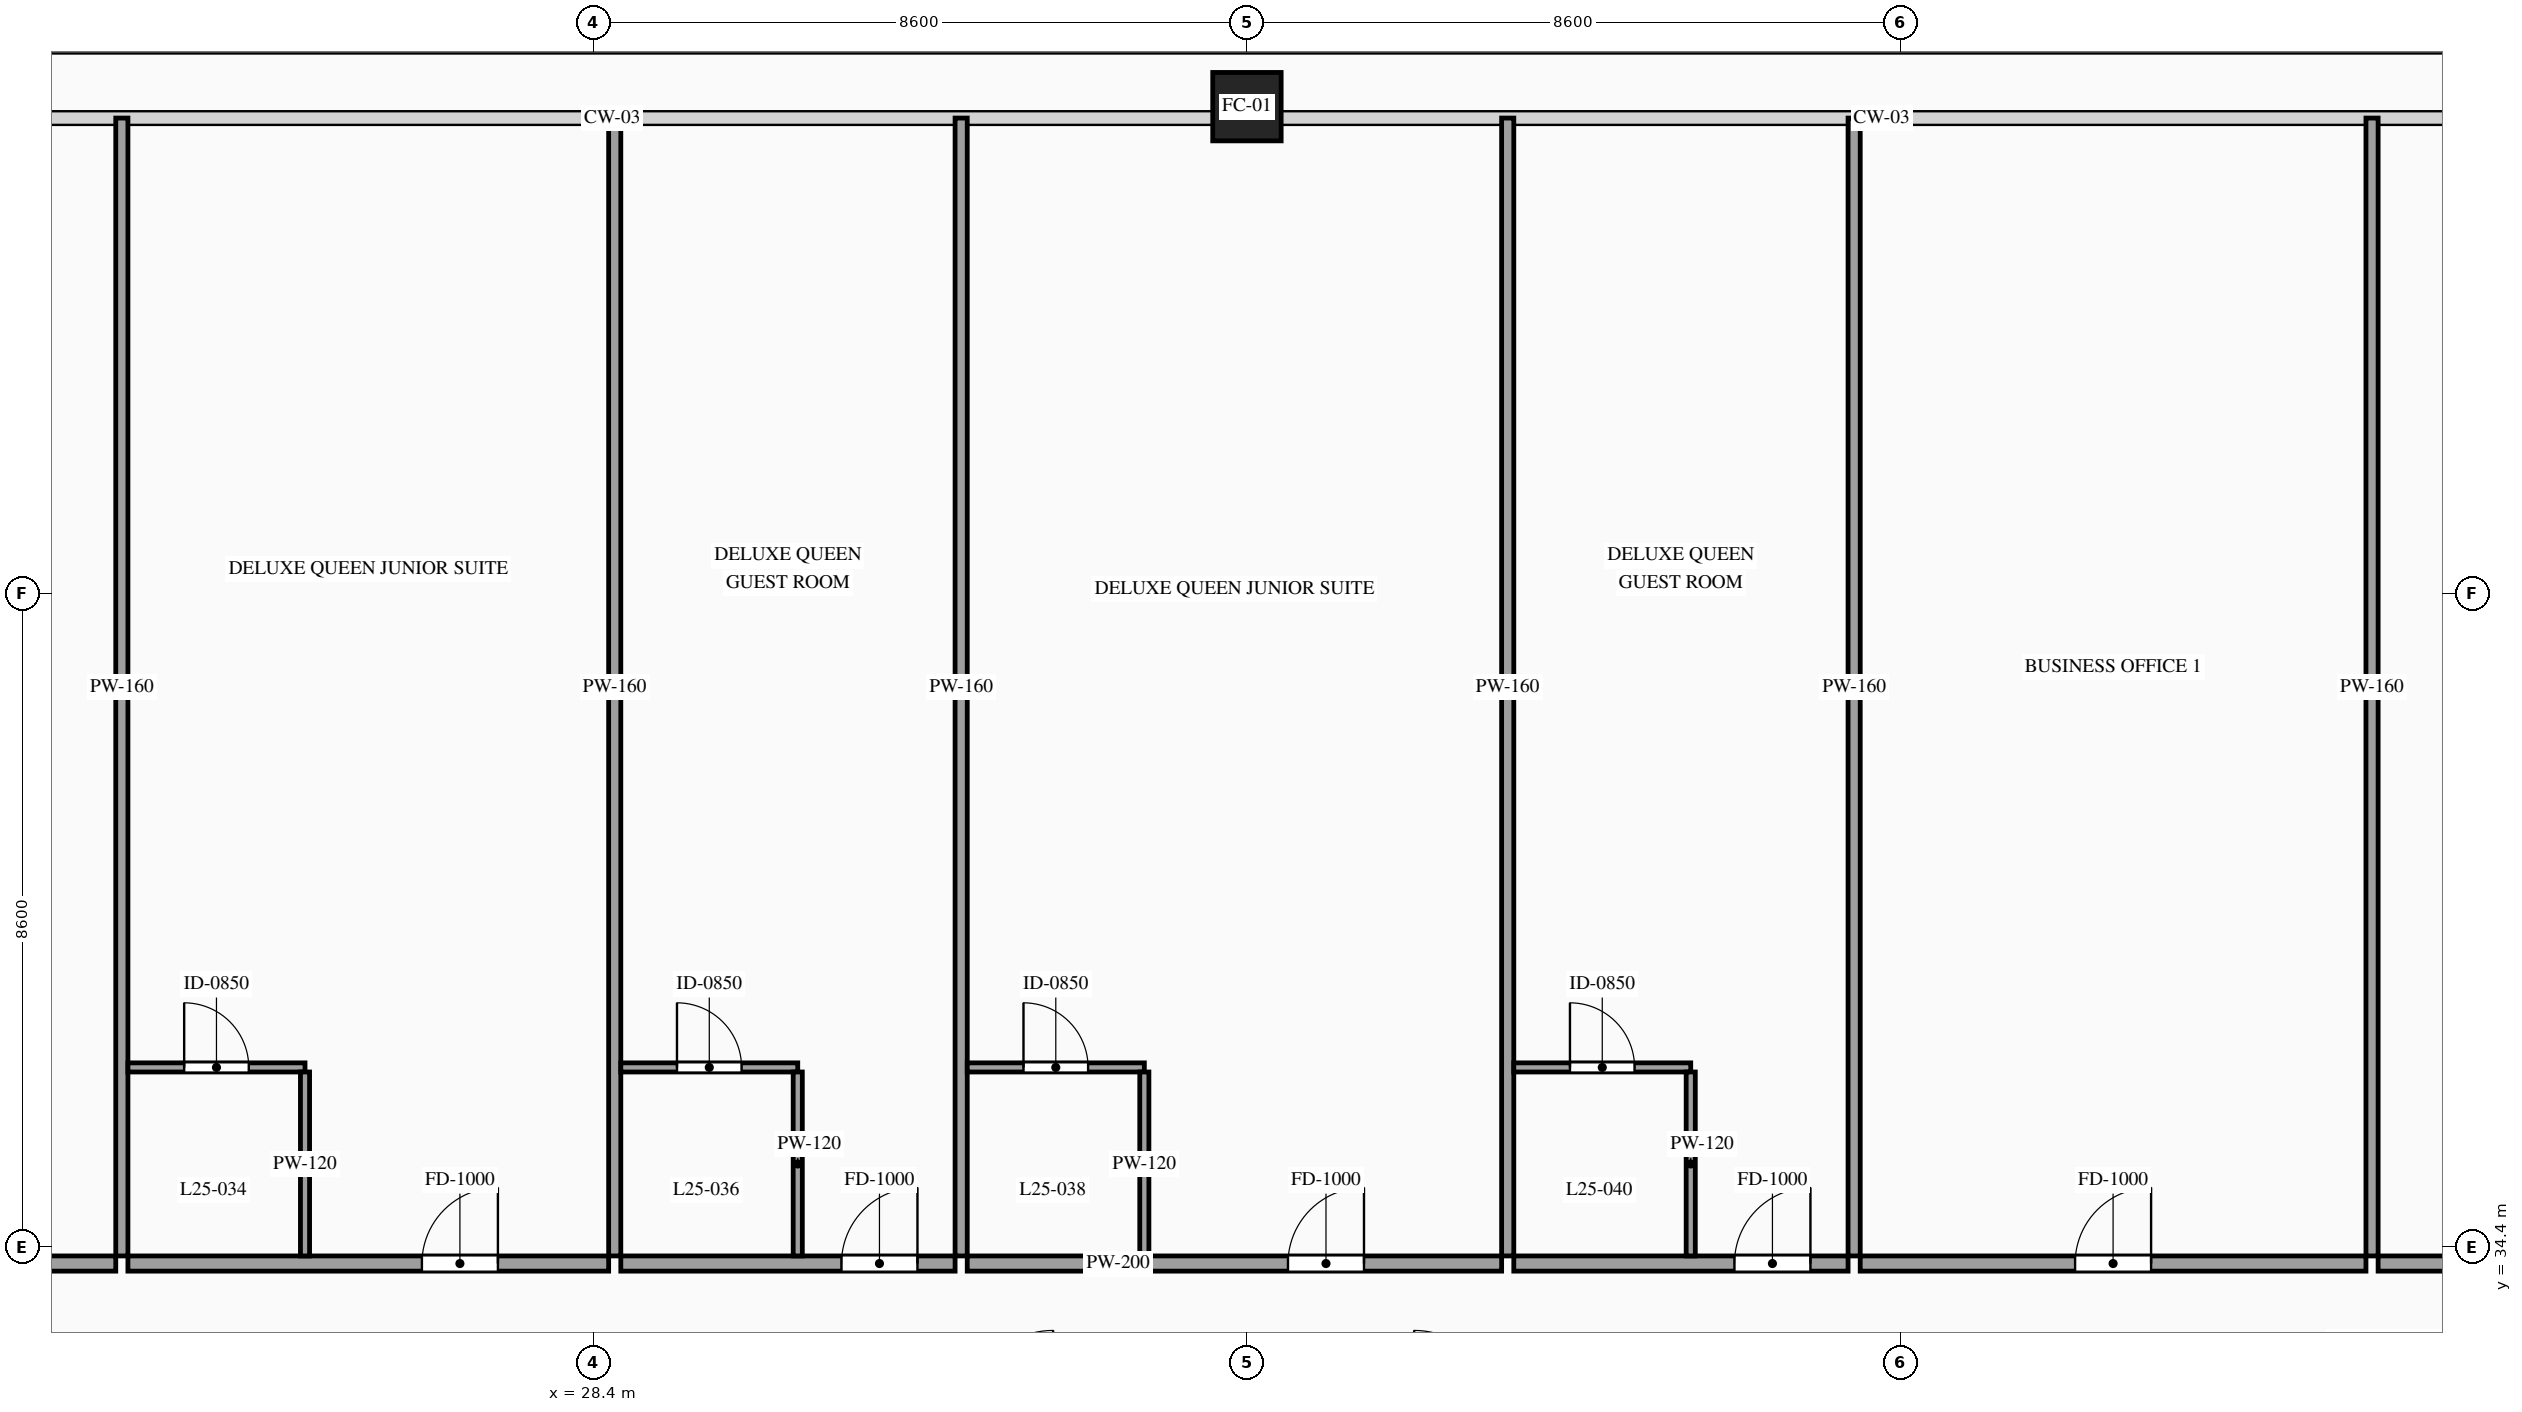
"""IFC4 building model, lengths in metres.
Left out: names, types, materials, properties, quantities, classifications, styles, units other than length and angle.
Written with IfcOpenShell. Run it as: python <this file> out.ifc"""

import sys

from ifc_helpers import new_model, si_unit, direction, frame, frame_2d, origin, origin_2d, place, context, subcontext, project, spatial, rectangle, hollow_rectangle, extrude, source, transform, mapped, element, fill, save


model = new_model("IFC4")
c1 = context("Model", 3, precision=1e-05, world=origin(), true_north=direction((0.0, 1.0)))
c2 = subcontext(c1, "Body", "Model", "MODEL_VIEW")
j1 = project(units=[si_unit("LENGTHUNIT", "METRE"), si_unit("PLANEANGLEUNIT", "RADIAN")], contexts=[c1])
p1 = place(None, origin())
s1 = spatial("IfcSite", under=j1, at=p1, CompositionType="ELEMENT")
p2 = place(p1, origin())
s2 = spatial("IfcBuilding", under=s1, at=p2, CompositionType="ELEMENT")
p3 = place(p2, frame((0.0, 0.0, 97.4)))
s3 = spatial("IfcBuildingStorey", under=s2, at=p3, CompositionType="ELEMENT", Elevation=97.4)
m1 = source(origin(), c2, "Body", "SweptSolid", [
    extrude(hollow_rectangle(XDim=0.9, YDim=0.9, WallThickness=0.042, at=origin_2d()), origin(), (0.0, 0.0, 1.0), 3.6),
])
p4 = place(p3, frame((37.0, 49.4, 0.0), z_axis=(0.0, 0.0, 1.0), x_axis=(1.0, 0.0, 0.0)))
e1 = element("IfcColumn", 1, at=p4, inside=s3, PredefinedType="COLUMN", context=c2, shape_type="MappedRepresentation", body=[
    mapped(m1, transform((0.0, 0.0, 0.0), scale=1.0)),
])
p5 = place(p3, frame((16.44, 34.18, 0.0), z_axis=(0.0, 0.0, 1.0), x_axis=(1.0, 0.0, 0.0)))
e2 = element("IfcWall", 2, at=p5, inside=s3, PredefinedType="PARTITIONING", context=c2, shape_type="SweptSolid", body=[
    extrude(rectangle(XDim=5.677, YDim=0.2, at=frame_2d((2.838, 0.0))), origin(), (0.0, 0.0, 1.0), 3.38),
])
p6 = place(p5, frame((3.543, 0.0, 0.0)))
e3 = element("IfcOpeningElement", 3, at=p6, cuts=e2, PredefinedType="OPENING", context=c2, shape_type="SweptSolid", body=[
    extrude(rectangle(XDim=1.0, YDim=2.2, at=frame_2d((0.5, 1.1))), frame((0.0, 0.115, 0.0), z_axis=(0.0, -1.0, 0.0), x_axis=(1.0, 0.0, 0.0)), (0.0, 0.0, 1.0), 0.23),
])
m2 = source(origin(), c2, "Body", "SweptSolid", [
    extrude(rectangle(XDim=14.97, YDim=0.16, at=frame_2d((7.485, 0.0))), origin(), (0.0, 0.0, 1.0), 3.38),
])
p7 = place(p3, frame((22.197, 34.28, 0.0), z_axis=(0.0, 0.0, 1.0), x_axis=(0.0, 1.0, 0.0)))
e4 = element("IfcWall", 4, at=p7, inside=s3, PredefinedType="PARTITIONING", context=c2, shape_type="MappedRepresentation", body=[
    mapped(m2, transform((0.0, 0.0, 0.0), scale=1.0)),
])
p8 = place(p3, frame((22.277, 34.18, 0.0), z_axis=(0.0, 0.0, 1.0), x_axis=(1.0, 0.0, 0.0)))
e5 = element("IfcWall", 5, at=p8, inside=s3, PredefinedType="PARTITIONING", context=c2, shape_type="SweptSolid", body=[
    extrude(rectangle(XDim=6.325, YDim=0.2, at=frame_2d((3.163, 0.0))), origin(), (0.0, 0.0, 1.0), 3.38),
])
p9 = place(p8, frame((3.868, 0.0, 0.0)))
e6 = element("IfcOpeningElement", 6, at=p9, cuts=e5, PredefinedType="OPENING", context=c2, shape_type="SweptSolid", body=[
    extrude(rectangle(XDim=1.0, YDim=2.2, at=frame_2d((0.5, 1.1))), frame((0.0, 0.115, 0.0), z_axis=(0.0, -1.0, 0.0), x_axis=(1.0, 0.0, 0.0)), (0.0, 0.0, 1.0), 0.23),
])
p10 = place(p3, frame((28.682, 34.28, 0.0), z_axis=(0.0, 0.0, 1.0), x_axis=(0.0, 1.0, 0.0)))
e7 = element("IfcWall", 7, at=p10, inside=s3, PredefinedType="PARTITIONING", context=c2, shape_type="MappedRepresentation", body=[
    mapped(m2, transform((0.0, 0.0, 0.0), scale=1.0)),
])
p11 = place(p3, frame((22.277, 36.76, 0.0), z_axis=(0.0, 0.0, 1.0), x_axis=(1.0, 0.0, 0.0)))
e8 = element("IfcWall", 8, at=p11, inside=s3, PredefinedType="PARTITIONING", context=c2, shape_type="SweptSolid", body=[
    extrude(rectangle(XDim=2.33, YDim=0.12, at=frame_2d((1.165, 0.0))), origin(), (0.0, 0.0, 1.0), 3.38),
])
p12 = place(p11, frame((0.74, 0.0, 0.0)))
e9 = element("IfcOpeningElement", 9, at=p12, cuts=e8, PredefinedType="OPENING", context=c2, shape_type="SweptSolid", body=[
    extrude(rectangle(XDim=0.85, YDim=2.1, at=frame_2d((0.425, 1.05))), frame((0.0, 0.075, 0.0), z_axis=(0.0, -1.0, 0.0), x_axis=(1.0, 0.0, 0.0)), (0.0, 0.0, 1.0), 0.15),
])
m3 = source(origin(), c2, "Body", "SweptSolid", [
    extrude(rectangle(XDim=2.42, YDim=0.12, at=frame_2d((1.21, 0.0))), origin(), (0.0, 0.0, 1.0), 3.38),
])
p13 = place(p3, frame((24.607, 34.28, 0.0), z_axis=(0.0, 0.0, 1.0), x_axis=(0.0, 1.0, 0.0)))
e10 = element("IfcWall", 10, at=p13, inside=s3, PredefinedType="PARTITIONING", context=c2, shape_type="MappedRepresentation", body=[
    mapped(m3, transform((0.0, 0.0, 0.0), scale=1.0)),
])
p14 = place(p3, frame((28.762, 34.18, 0.0), z_axis=(0.0, 0.0, 1.0), x_axis=(1.0, 0.0, 0.0)))
e11 = element("IfcWall", 11, at=p14, inside=s3, PredefinedType="PARTITIONING", context=c2, shape_type="SweptSolid", body=[
    extrude(rectangle(XDim=4.398, YDim=0.2, at=frame_2d((2.199, 0.0))), origin(), (0.0, 0.0, 1.0), 3.38),
])
p15 = place(p14, frame((2.903, 0.0, 0.0)))
e12 = element("IfcOpeningElement", 12, at=p15, cuts=e11, PredefinedType="OPENING", context=c2, shape_type="SweptSolid", body=[
    extrude(rectangle(XDim=1.0, YDim=2.2, at=frame_2d((0.5, 1.1))), frame((0.0, 0.115, 0.0), z_axis=(0.0, -1.0, 0.0), x_axis=(1.0, 0.0, 0.0)), (0.0, 0.0, 1.0), 0.23),
])
p16 = place(p3, frame((33.24, 34.28, 0.0), z_axis=(0.0, 0.0, 1.0), x_axis=(0.0, 1.0, 0.0)))
e13 = element("IfcWall", 13, at=p16, inside=s3, PredefinedType="PARTITIONING", context=c2, shape_type="MappedRepresentation", body=[
    mapped(m2, transform((0.0, 0.0, 0.0), scale=1.0)),
])
p17 = place(p3, frame((28.762, 36.76, 0.0), z_axis=(0.0, 0.0, 1.0), x_axis=(1.0, 0.0, 0.0)))
e14 = element("IfcWall", 14, at=p17, inside=s3, PredefinedType="PARTITIONING", context=c2, shape_type="SweptSolid", body=[
    extrude(rectangle(XDim=2.328, YDim=0.12, at=frame_2d((1.164, 0.0))), origin(), (0.0, 0.0, 1.0), 3.38),
])
p18 = place(p17, frame((0.739, 0.0, 0.0)))
e15 = element("IfcOpeningElement", 15, at=p18, cuts=e14, PredefinedType="OPENING", context=c2, shape_type="SweptSolid", body=[
    extrude(rectangle(XDim=0.85, YDim=2.1, at=frame_2d((0.425, 1.05))), frame((0.0, 0.075, 0.0), z_axis=(0.0, -1.0, 0.0), x_axis=(1.0, 0.0, 0.0)), (0.0, 0.0, 1.0), 0.15),
])
p19 = place(p3, frame((31.09, 34.28, 0.0), z_axis=(0.0, 0.0, 1.0), x_axis=(0.0, 1.0, 0.0)))
e16 = element("IfcWall", 16, at=p19, inside=s3, PredefinedType="PARTITIONING", context=c2, shape_type="MappedRepresentation", body=[
    mapped(m3, transform((0.0, 0.0, 0.0), scale=1.0)),
])
p20 = place(p3, frame((33.32, 34.18, 0.0), z_axis=(0.0, 0.0, 1.0), x_axis=(1.0, 0.0, 0.0)))
e17 = element("IfcWall", 17, at=p20, inside=s3, PredefinedType="PARTITIONING", context=c2, shape_type="SweptSolid", body=[
    extrude(rectangle(XDim=7.031, YDim=0.2, at=frame_2d((3.516, 0.0))), origin(), (0.0, 0.0, 1.0), 3.38),
])
p21 = place(p20, frame((4.22, 0.0, 0.0)))
e18 = element("IfcOpeningElement", 18, at=p21, cuts=e17, PredefinedType="OPENING", context=c2, shape_type="SweptSolid", body=[
    extrude(rectangle(XDim=1.0, YDim=2.2, at=frame_2d((0.5, 1.1))), frame((0.0, 0.115, 0.0), z_axis=(0.0, -1.0, 0.0), x_axis=(1.0, 0.0, 0.0)), (0.0, 0.0, 1.0), 0.23),
])
p22 = place(p3, frame((40.431, 34.28, 0.0), z_axis=(0.0, 0.0, 1.0), x_axis=(0.0, 1.0, 0.0)))
e19 = element("IfcWall", 19, at=p22, inside=s3, PredefinedType="PARTITIONING", context=c2, shape_type="MappedRepresentation", body=[
    mapped(m2, transform((0.0, 0.0, 0.0), scale=1.0)),
])
p23 = place(p3, frame((33.32, 36.76, 0.0), z_axis=(0.0, 0.0, 1.0), x_axis=(1.0, 0.0, 0.0)))
e20 = element("IfcWall", 20, at=p23, inside=s3, PredefinedType="PARTITIONING", context=c2, shape_type="SweptSolid", body=[
    extrude(rectangle(XDim=2.33, YDim=0.12, at=frame_2d((1.165, 0.0))), origin(), (0.0, 0.0, 1.0), 3.38),
])
p24 = place(p23, frame((0.74, 0.0, 0.0)))
e21 = element("IfcOpeningElement", 21, at=p24, cuts=e20, PredefinedType="OPENING", context=c2, shape_type="SweptSolid", body=[
    extrude(rectangle(XDim=0.85, YDim=2.1, at=frame_2d((0.425, 1.05))), frame((0.0, 0.075, 0.0), z_axis=(0.0, -1.0, 0.0), x_axis=(1.0, 0.0, 0.0)), (0.0, 0.0, 1.0), 0.15),
])
p25 = place(p3, frame((35.65, 34.28, 0.0), z_axis=(0.0, 0.0, 1.0), x_axis=(0.0, 1.0, 0.0)))
e22 = element("IfcWall", 22, at=p25, inside=s3, PredefinedType="PARTITIONING", context=c2, shape_type="MappedRepresentation", body=[
    mapped(m3, transform((0.0, 0.0, 0.0), scale=1.0)),
])
p26 = place(p3, frame((40.511, 34.18, 0.0), z_axis=(0.0, 0.0, 1.0), x_axis=(1.0, 0.0, 0.0)))
e23 = element("IfcWall", 23, at=p26, inside=s3, PredefinedType="PARTITIONING", context=c2, shape_type="SweptSolid", body=[
    extrude(rectangle(XDim=4.398, YDim=0.2, at=frame_2d((2.199, 0.0))), origin(), (0.0, 0.0, 1.0), 3.38),
])
p27 = place(p26, frame((2.903, 0.0, 0.0)))
e24 = element("IfcOpeningElement", 24, at=p27, cuts=e23, PredefinedType="OPENING", context=c2, shape_type="SweptSolid", body=[
    extrude(rectangle(XDim=1.0, YDim=2.2, at=frame_2d((0.5, 1.1))), frame((0.0, 0.115, 0.0), z_axis=(0.0, -1.0, 0.0), x_axis=(1.0, 0.0, 0.0)), (0.0, 0.0, 1.0), 0.23),
])
p28 = place(p3, frame((44.989, 34.28, 0.0), z_axis=(0.0, 0.0, 1.0), x_axis=(0.0, 1.0, 0.0)))
e25 = element("IfcWall", 25, at=p28, inside=s3, PredefinedType="PARTITIONING", context=c2, shape_type="MappedRepresentation", body=[
    mapped(m2, transform((0.0, 0.0, 0.0), scale=1.0)),
])
p29 = place(p3, frame((40.511, 36.76, 0.0), z_axis=(0.0, 0.0, 1.0), x_axis=(1.0, 0.0, 0.0)))
e26 = element("IfcWall", 26, at=p29, inside=s3, PredefinedType="PARTITIONING", context=c2, shape_type="SweptSolid", body=[
    extrude(rectangle(XDim=2.328, YDim=0.12, at=frame_2d((1.164, 0.0))), origin(), (0.0, 0.0, 1.0), 3.38),
])
p30 = place(p29, frame((0.739, 0.0, 0.0)))
e27 = element("IfcOpeningElement", 27, at=p30, cuts=e26, PredefinedType="OPENING", context=c2, shape_type="SweptSolid", body=[
    extrude(rectangle(XDim=0.85, YDim=2.1, at=frame_2d((0.425, 1.05))), frame((0.0, 0.075, 0.0), z_axis=(0.0, -1.0, 0.0), x_axis=(1.0, 0.0, 0.0)), (0.0, 0.0, 1.0), 0.15),
])
p31 = place(p3, frame((42.839, 34.28, 0.0), z_axis=(0.0, 0.0, 1.0), x_axis=(0.0, 1.0, 0.0)))
e28 = element("IfcWall", 28, at=p31, inside=s3, PredefinedType="PARTITIONING", context=c2, shape_type="MappedRepresentation", body=[
    mapped(m3, transform((0.0, 0.0, 0.0), scale=1.0)),
])
p32 = place(p3, frame((45.069, 34.18, 0.0), z_axis=(0.0, 0.0, 1.0), x_axis=(1.0, 0.0, 0.0)))
e29 = element("IfcWall", 29, at=p32, inside=s3, PredefinedType="PARTITIONING", context=c2, shape_type="SweptSolid", body=[
    extrude(rectangle(XDim=6.654, YDim=0.2, at=frame_2d((3.327, 0.0))), origin(), (0.0, 0.0, 1.0), 3.38),
])
p33 = place(p32, frame((2.827, 0.0, 0.0)))
e30 = element("IfcOpeningElement", 30, at=p33, cuts=e29, PredefinedType="OPENING", context=c2, shape_type="SweptSolid", body=[
    extrude(rectangle(XDim=1.0, YDim=2.2, at=frame_2d((0.5, 1.1))), frame((0.0, 0.115, 0.0), z_axis=(0.0, -1.0, 0.0), x_axis=(1.0, 0.0, 0.0)), (0.0, 0.0, 1.0), 0.23),
])
p34 = place(p3, frame((51.803, 34.28, 0.0), z_axis=(0.0, 0.0, 1.0), x_axis=(0.0, 1.0, 0.0)))
e31 = element("IfcWall", 31, at=p34, inside=s3, PredefinedType="PARTITIONING", context=c2, shape_type="MappedRepresentation", body=[
    mapped(m2, transform((0.0, 0.0, 0.0), scale=1.0)),
])
p35 = place(p3, frame((51.883, 34.18, 0.0), z_axis=(0.0, 0.0, 1.0), x_axis=(1.0, 0.0, 0.0)))
e32 = element("IfcWall", 32, at=p35, inside=s3, PredefinedType="PARTITIONING", context=c2, shape_type="SweptSolid", body=[
    extrude(rectangle(XDim=5.677, YDim=0.2, at=frame_2d((2.838, 0.0))), origin(), (0.0, 0.0, 1.0), 3.38),
])
p36 = place(p35, frame((2.339, 0.0, 0.0)))
e33 = element("IfcOpeningElement", 33, at=p36, cuts=e32, PredefinedType="OPENING", context=c2, shape_type="SweptSolid", body=[
    extrude(rectangle(XDim=1.0, YDim=2.2, at=frame_2d((0.5, 1.1))), frame((0.0, 0.115, 0.0), z_axis=(0.0, -1.0, 0.0), x_axis=(1.0, 0.0, 0.0)), (0.0, 0.0, 1.0), 0.23),
])
m4 = source(origin(), c2, "Body", "SweptSolid", [
    extrude(rectangle(XDim=1.0, YDim=2.2, at=frame_2d((0.5, 1.1))), frame((0.0, 0.025, 0.0), z_axis=(0.0, -1.0, 0.0), x_axis=(1.0, 0.0, 0.0)), (0.0, 0.0, 1.0), 0.05),
])
p37 = place(p9, origin())
e34 = element("IfcDoor", 34, at=p37, inside=s3, OperationType="SINGLE_SWING_RIGHT", PredefinedType="DOOR", context=c2, shape_type="MappedRepresentation", body=[
    mapped(m4, transform((0.0, 0.0, 0.0), scale=1.0)),
])
fill(e6, e34)
m5 = source(origin(), c2, "Body", "SweptSolid", [
    extrude(rectangle(XDim=0.85, YDim=2.1, at=frame_2d((0.425, 1.05))), frame((0.0, 0.025, 0.0), z_axis=(0.0, -1.0, 0.0), x_axis=(1.0, 0.0, 0.0)), (0.0, 0.0, 1.0), 0.05),
])
p38 = place(p12, origin())
e35 = element("IfcDoor", 35, at=p38, inside=s3, OperationType="SINGLE_SWING_LEFT", PredefinedType="DOOR", context=c2, shape_type="MappedRepresentation", body=[
    mapped(m5, transform((0.0, 0.0, 0.0), scale=1.0)),
])
fill(e9, e35)
p39 = place(p15, origin())
e36 = element("IfcDoor", 36, at=p39, inside=s3, OperationType="SINGLE_SWING_RIGHT", PredefinedType="DOOR", context=c2, shape_type="MappedRepresentation", body=[
    mapped(m4, transform((0.0, 0.0, 0.0), scale=1.0)),
])
fill(e12, e36)
p40 = place(p18, origin())
e37 = element("IfcDoor", 37, at=p40, inside=s3, OperationType="SINGLE_SWING_LEFT", PredefinedType="DOOR", context=c2, shape_type="MappedRepresentation", body=[
    mapped(m5, transform((0.0, 0.0, 0.0), scale=1.0)),
])
fill(e15, e37)
p41 = place(p21, origin())
e38 = element("IfcDoor", 38, at=p41, inside=s3, OperationType="SINGLE_SWING_RIGHT", PredefinedType="DOOR", context=c2, shape_type="MappedRepresentation", body=[
    mapped(m4, transform((0.0, 0.0, 0.0), scale=1.0)),
])
fill(e18, e38)
p42 = place(p24, origin())
e39 = element("IfcDoor", 39, at=p42, inside=s3, OperationType="SINGLE_SWING_LEFT", PredefinedType="DOOR", context=c2, shape_type="MappedRepresentation", body=[
    mapped(m5, transform((0.0, 0.0, 0.0), scale=1.0)),
])
fill(e21, e39)
p43 = place(p27, origin())
e40 = element("IfcDoor", 40, at=p43, inside=s3, OperationType="SINGLE_SWING_RIGHT", PredefinedType="DOOR", context=c2, shape_type="MappedRepresentation", body=[
    mapped(m4, transform((0.0, 0.0, 0.0), scale=1.0)),
])
fill(e24, e40)
p44 = place(p30, origin())
e41 = element("IfcDoor", 41, at=p44, inside=s3, OperationType="SINGLE_SWING_LEFT", PredefinedType="DOOR", context=c2, shape_type="MappedRepresentation", body=[
    mapped(m5, transform((0.0, 0.0, 0.0), scale=1.0)),
])
fill(e27, e41)
p45 = place(p33, origin())
e42 = element("IfcDoor", 42, at=p45, inside=s3, OperationType="SINGLE_SWING_RIGHT", PredefinedType="DOOR", context=c2, shape_type="MappedRepresentation", body=[
    mapped(m4, transform((0.0, 0.0, 0.0), scale=1.0)),
])
fill(e30, e42)
save(model, sys.argv[1])
